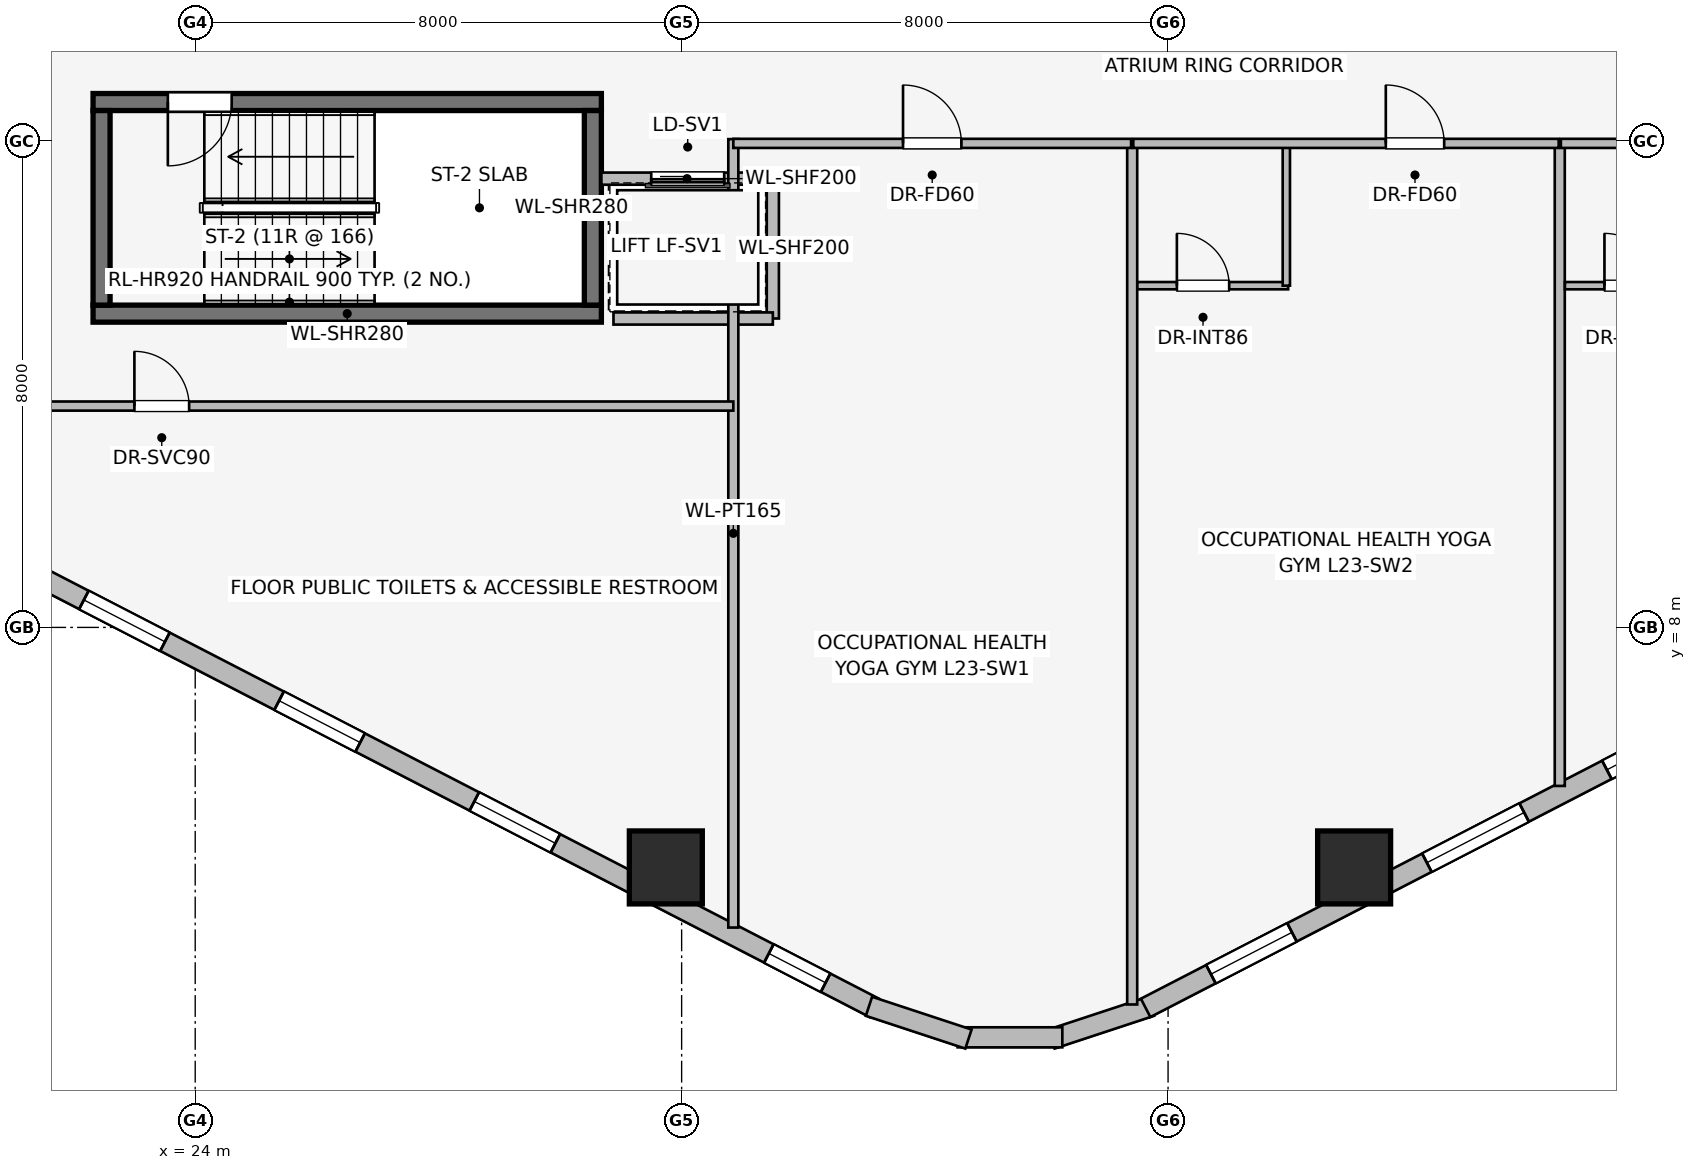
"""IFC4 building model, lengths in metres.
Left out: names, types, materials, properties, quantities, classifications, styles, units other than length and angle.
Written with IfcOpenShell. Run it as: python <this file> out.ifc"""

import sys

from ifc_helpers import new_model, si_unit, direction, frame, frame_2d, origin, origin_2d, place, context, subcontext, project, spatial, rectangle, extrude, element, fill, save


model = new_model("IFC4")
c1 = context("Model", 3, precision=1e-05, world=origin(), true_north=direction((0.0, 1.0)))
c2 = subcontext(c1, "Body", "Model", "MODEL_VIEW")
j1 = project(units=[si_unit("LENGTHUNIT", "METRE"), si_unit("PLANEANGLEUNIT", "RADIAN")], contexts=[c1])
p1 = place(None, origin())
s1 = spatial("IfcSite", under=j1, at=p1, CompositionType="ELEMENT")
p2 = place(p1, origin())
s2 = spatial("IfcBuilding", under=s1, at=p2, CompositionType="ELEMENT")
p3 = place(p2, frame((0.0, 0.0, 89.05)))
s3 = spatial("IfcBuildingStorey", under=s2, at=p3, CompositionType="ELEMENT", Elevation=89.05)
p4 = place(p3, frame((22.32, 13.16, 0.0), z_axis=(0.0, 0.0, 1.0), x_axis=(1.0, 0.0, 0.0)))
e1 = element("IfcWall", 1, at=p4, inside=s3, PredefinedType="SHEAR", context=c2, shape_type="SweptSolid", body=[
    extrude(rectangle(XDim=8.36, YDim=0.28, at=frame_2d((4.18, 0.0))), origin(), (0.0, 0.0, 1.0), 3.65),
])
p5 = place(p3, frame((30.68, 16.64, 0.0), z_axis=(0.0, 0.0, 1.0), x_axis=(-1.0, 0.0, 0.0)))
e2 = element("IfcWall", 2, at=p5, inside=s3, PredefinedType="SHEAR", context=c2, shape_type="SweptSolid", body=[
    extrude(rectangle(XDim=8.36, YDim=0.28, at=frame_2d((4.18, 0.0))), origin(), (0.0, 0.0, 1.0), 3.65),
])
p6 = place(p5, frame((6.08, 0.0, 0.0)))
e3 = element("IfcOpeningElement", 3, at=p6, cuts=e2, PredefinedType="OPENING", context=c2, shape_type="SweptSolid", body=[
    extrude(rectangle(XDim=1.05, YDim=2.0, at=frame_2d((0.525, 1.0))), frame((0.0, 0.15, 0.0), z_axis=(0.0, -1.0, 0.0), x_axis=(1.0, 0.0, 0.0)), (0.0, 0.0, 1.0), 0.3),
])
for number, where, z_axis, x_axis in (
    (4, (22.46, 16.5, 0.0), (0.0, 0.0, 1.0), (0.0, -1.0, 0.0)),
    (5, (30.54, 13.3, 0.0), (0.0, 0.0, 1.0), (0.0, 1.0, 0.0)),
):
    element("IfcWall", number, at=place(p3, frame(where, z_axis=z_axis, x_axis=x_axis)), inside=s3, PredefinedType="SHEAR", context=c2, shape_type="SweptSolid", body=[
        extrude(rectangle(XDim=3.2, YDim=0.28, at=frame_2d((1.6, 0.0))), origin(), (0.0, 0.0, 1.0), 3.65),
    ])
for number, where, z_axis, x_axis in (
    (6, (31.74, 4.053, 0.0), (0.0, 0.0, 1.0), (1.0, 0.0, 0.0)),
    (7, (43.06, 4.053, 0.0), (0.0, 0.0, 1.0), (1.0, 0.0, 0.0)),
):
    element("IfcColumn", number, at=place(p3, frame(where, z_axis=z_axis, x_axis=x_axis)), inside=s3, PredefinedType="COLUMN", context=c2, shape_type="SweptSolid", body=[
        extrude(rectangle(XDim=1.2, YDim=1.2, at=origin_2d()), origin(), (0.0, 0.0, 1.0), 3.65),
    ])
p7 = place(p3, frame((35.169, 1.743, 0.0), z_axis=(0.0, 0.0, 1.0), x_axis=(-0.888634413993, 0.458616264721, 0.0)))
e8 = element("IfcWall", 8, at=p7, inside=s3, PredefinedType="STANDARD", context=c2, shape_type="SweptSolid", body=[
    extrude(rectangle(XDim=20.531, YDim=0.34, at=frame_2d((10.266, 0.0))), origin(), (0.0, 0.0, 1.0), 2.684),
])
p8 = place(p7, frame((0.902, 0.0, 0.75)))
e9 = element("IfcOpeningElement", 9, at=p8, cuts=e8, PredefinedType="OPENING", context=c2, shape_type="SweptSolid", body=[
    extrude(rectangle(XDim=1.05, YDim=1.4, at=frame_2d((0.525, 0.7))), frame((0.0, 0.18, 0.0), z_axis=(0.0, -1.0, 0.0), x_axis=(1.0, 0.0, 0.0)), (0.0, 0.0, 1.0), 0.36),
])
p9 = place(p7, frame((5.903, 0.0, 0.75)))
e10 = element("IfcOpeningElement", 10, at=p9, cuts=e8, PredefinedType="OPENING", context=c2, shape_type="SweptSolid", body=[
    extrude(rectangle(XDim=1.5, YDim=1.5, at=frame_2d((0.75, 0.75))), frame((0.0, 0.18, 0.0), z_axis=(0.0, -1.0, 0.0), x_axis=(1.0, 0.0, 0.0)), (0.0, 0.0, 1.0), 0.36),
])
p10 = place(p7, frame((9.516, 0.0, 0.75)))
e11 = element("IfcOpeningElement", 11, at=p10, cuts=e8, PredefinedType="OPENING", context=c2, shape_type="SweptSolid", body=[
    extrude(rectangle(XDim=1.5, YDim=1.5, at=frame_2d((0.75, 0.75))), frame((0.0, 0.18, 0.0), z_axis=(0.0, -1.0, 0.0), x_axis=(1.0, 0.0, 0.0)), (0.0, 0.0, 1.0), 0.36),
])
p11 = place(p7, frame((13.129, 0.0, 0.75)))
e12 = element("IfcOpeningElement", 12, at=p11, cuts=e8, PredefinedType="OPENING", context=c2, shape_type="SweptSolid", body=[
    extrude(rectangle(XDim=1.5, YDim=1.5, at=frame_2d((0.75, 0.75))), frame((0.0, 0.18, 0.0), z_axis=(0.0, -1.0, 0.0), x_axis=(1.0, 0.0, 0.0)), (0.0, 0.0, 1.0), 0.36),
])
p12 = place(p7, frame((17.673, 0.0, 0.75)))
e13 = element("IfcOpeningElement", 13, at=p12, cuts=e8, PredefinedType="OPENING", context=c2, shape_type="SweptSolid", body=[
    extrude(rectangle(XDim=1.8, YDim=1.5, at=frame_2d((0.9, 0.75))), frame((0.0, 0.18, 0.0), z_axis=(0.0, -1.0, 0.0), x_axis=(1.0, 0.0, 0.0)), (0.0, 0.0, 1.0), 0.36),
])
p13 = place(p3, frame((39.719, 1.769, 0.0), z_axis=(0.0, 0.0, 1.0), x_axis=(-0.94976901097, -0.312951794691, 0.0)))
e14 = element("IfcWall", 14, at=p13, inside=s3, PredefinedType="STANDARD", context=c2, shape_type="SweptSolid", body=[
    extrude(rectangle(XDim=1.722, YDim=0.33, at=frame_2d((0.861, 0.0))), origin(), (0.0, 0.0, 1.0), 3.39),
])
p14 = place(p3, frame((38.261, 1.259, 0.0), z_axis=(0.0, 0.0, 1.0), x_axis=(-1.0, 0.0, 0.0)))
e15 = element("IfcWall", 15, at=p14, inside=s3, PredefinedType="STANDARD", context=c2, shape_type="SweptSolid", body=[
    extrude(rectangle(XDim=1.722, YDim=0.33, at=frame_2d((0.861, 0.0))), origin(), (0.0, 0.0, 1.0), 3.39),
])
p15 = place(p3, frame((36.717, 1.23, 0.0), z_axis=(0.0, 0.0, 1.0), x_axis=(-0.94976901097, 0.312951794691, 0.0)))
e16 = element("IfcWall", 16, at=p15, inside=s3, PredefinedType="STANDARD", context=c2, shape_type="SweptSolid", body=[
    extrude(rectangle(XDim=1.722, YDim=0.33, at=frame_2d((0.861, 0.0))), origin(), (0.0, 0.0, 1.0), 3.39),
])
p16 = place(p3, frame((57.876, 11.159, 0.0), z_axis=(0.0, 0.0, 1.0), x_axis=(-0.888634413993, -0.458616264721, 0.0)))
e17 = element("IfcWall", 17, at=p16, inside=s3, PredefinedType="STANDARD", context=c2, shape_type="SweptSolid", body=[
    extrude(rectangle(XDim=20.531, YDim=0.34, at=frame_2d((10.266, 0.0))), origin(), (0.0, 0.0, 1.0), 2.684),
])
p17 = place(p16, frame((1.058, 0.0, 0.75)))
e18 = element("IfcOpeningElement", 18, at=p17, cuts=e17, PredefinedType="OPENING", context=c2, shape_type="SweptSolid", body=[
    extrude(rectangle(XDim=1.8, YDim=1.5, at=frame_2d((0.9, 0.75))), frame((0.0, 0.18, 0.0), z_axis=(0.0, -1.0, 0.0), x_axis=(1.0, 0.0, 0.0)), (0.0, 0.0, 1.0), 0.36),
])
p18 = place(p16, frame((5.703, 0.0, 0.75)))
e19 = element("IfcOpeningElement", 19, at=p18, cuts=e17, PredefinedType="OPENING", context=c2, shape_type="SweptSolid", body=[
    extrude(rectangle(XDim=1.5, YDim=1.5, at=frame_2d((0.75, 0.75))), frame((0.0, 0.18, 0.0), z_axis=(0.0, -1.0, 0.0), x_axis=(1.0, 0.0, 0.0)), (0.0, 0.0, 1.0), 0.36),
])
p19 = place(p16, frame((8.099, 0.0, 0.75)))
e20 = element("IfcOpeningElement", 20, at=p19, cuts=e17, PredefinedType="OPENING", context=c2, shape_type="SweptSolid", body=[
    extrude(rectangle(XDim=1.5, YDim=1.5, at=frame_2d((0.75, 0.75))), frame((0.0, 0.18, 0.0), z_axis=(0.0, -1.0, 0.0), x_axis=(1.0, 0.0, 0.0)), (0.0, 0.0, 1.0), 0.36),
])
p20 = place(p16, frame((10.495, 0.0, 0.75)))
e21 = element("IfcOpeningElement", 21, at=p20, cuts=e17, PredefinedType="OPENING", context=c2, shape_type="SweptSolid", body=[
    extrude(rectangle(XDim=1.5, YDim=1.5, at=frame_2d((0.75, 0.75))), frame((0.0, 0.18, 0.0), z_axis=(0.0, -1.0, 0.0), x_axis=(1.0, 0.0, 0.0)), (0.0, 0.0, 1.0), 0.36),
])
p21 = place(p16, frame((13.526, 0.0, 0.75)))
e22 = element("IfcOpeningElement", 22, at=p21, cuts=e17, PredefinedType="OPENING", context=c2, shape_type="SweptSolid", body=[
    extrude(rectangle(XDim=1.8, YDim=1.5, at=frame_2d((0.9, 0.75))), frame((0.0, 0.18, 0.0), z_axis=(0.0, -1.0, 0.0), x_axis=(1.0, 0.0, 0.0)), (0.0, 0.0, 1.0), 0.36),
])
p22 = place(p16, frame((17.823, 0.0, 0.75)))
e23 = element("IfcOpeningElement", 23, at=p22, cuts=e17, PredefinedType="OPENING", context=c2, shape_type="SweptSolid", body=[
    extrude(rectangle(XDim=1.5, YDim=1.5, at=frame_2d((0.75, 0.75))), frame((0.0, 0.18, 0.0), z_axis=(0.0, -1.0, 0.0), x_axis=(1.0, 0.0, 0.0)), (0.0, 0.0, 1.0), 0.36),
])
p23 = place(p3, frame((33.5, 15.38, 0.0), z_axis=(0.0, 0.0, 1.0), x_axis=(-1.0, 0.0, 0.0)))
e24 = element("IfcWall", 24, at=p23, inside=s3, PredefinedType="PARTITIONING", context=c2, shape_type="SweptSolid", body=[
    extrude(rectangle(XDim=2.82, YDim=0.2, at=frame_2d((1.41, 0.0))), origin(), (0.0, 0.0, 1.0), 3.39),
])
p24 = place(p23, frame((0.8, 0.0, 0.0)))
e25 = element("IfcOpeningElement", 25, at=p24, cuts=e24, PredefinedType="OPENING", context=c2, shape_type="SweptSolid", body=[
    extrude(rectangle(XDim=1.2, YDim=2.2, at=frame_2d((0.6, 1.1))), frame((0.0, 0.11, 0.0), z_axis=(0.0, -1.0, 0.0), x_axis=(1.0, 0.0, 0.0)), (0.0, 0.0, 1.0), 0.22),
])
p25 = place(p3, frame((33.5, 13.08, 0.0), z_axis=(0.0, 0.0, 1.0), x_axis=(0.0, 1.0, 0.0)))
e26 = element("IfcWall", 26, at=p25, inside=s3, PredefinedType="PARTITIONING", context=c2, shape_type="SweptSolid", body=[
    extrude(rectangle(XDim=2.3, YDim=0.2, at=frame_2d((1.15, 0.0))), origin(), (0.0, 0.0, 1.0), 3.39),
])
p26 = place(p3, frame((30.879, 13.08, 0.0), z_axis=(0.0, 0.0, 1.0), x_axis=(1.0, 0.0, 0.0)))
e27 = element("IfcWall", 27, at=p26, inside=s3, PredefinedType="PARTITIONING", context=c2, shape_type="SweptSolid", body=[
    extrude(rectangle(XDim=2.621, YDim=0.2, at=frame_2d((1.311, 0.0))), origin(), (0.0, 0.0, 1.0), 3.39),
])
p27 = place(p3, frame((32.85, 3.064, 0.0), z_axis=(0.0, 0.0, 1.0), x_axis=(0.0, 1.0, 0.0)))
e28 = element("IfcWall", 28, at=p27, inside=s3, PredefinedType="PARTITIONING", context=c2, shape_type="SweptSolid", body=[
    extrude(rectangle(XDim=12.966, YDim=0.165, at=frame_2d((6.483, 0.0))), origin(), (0.0, 0.0, 1.0), 3.39),
])
p28 = place(p3, frame((16.487, 11.64, 0.0), z_axis=(0.0, 0.0, 1.0), x_axis=(1.0, 0.0, 0.0)))
e29 = element("IfcWall", 29, at=p28, inside=s3, PredefinedType="PARTITIONING", context=c2, shape_type="SweptSolid", body=[
    extrude(rectangle(XDim=16.363, YDim=0.15, at=frame_2d((8.182, 0.0))), origin(), (0.0, 0.0, 1.0), 3.39),
])
p29 = place(p28, frame((6.513, 0.0, 0.0)))
e30 = element("IfcOpeningElement", 30, at=p29, cuts=e29, PredefinedType="OPENING", context=c2, shape_type="SweptSolid", body=[
    extrude(rectangle(XDim=0.9, YDim=2.0, at=frame_2d((0.45, 1.0))), frame((0.0, 0.085, 0.0), z_axis=(0.0, -1.0, 0.0), x_axis=(1.0, 0.0, 0.0)), (0.0, 0.0, 1.0), 0.17),
])
p30 = place(p3, frame((39.41, 1.799, 0.0), z_axis=(0.0, 0.0, 1.0), x_axis=(0.0, 1.0, 0.0)))
e31 = element("IfcWall", 31, at=p30, inside=s3, PredefinedType="PARTITIONING", context=c2, shape_type="SweptSolid", body=[
    extrude(rectangle(XDim=14.131, YDim=0.165, at=frame_2d((7.065, 0.0))), origin(), (0.0, 0.0, 1.0), 3.39),
])
p31 = place(p3, frame((46.442, 5.393, 0.0), z_axis=(0.0, 0.0, 1.0), x_axis=(0.0, 1.0, 0.0)))
e32 = element("IfcWall", 32, at=p31, inside=s3, PredefinedType="PARTITIONING", context=c2, shape_type="SweptSolid", body=[
    extrude(rectangle(XDim=10.537, YDim=0.165, at=frame_2d((5.269, 0.0))), origin(), (0.0, 0.0, 1.0), 3.39),
])
p32 = place(p3, frame((32.85, 15.96, 0.0), z_axis=(0.0, 0.0, 1.0), x_axis=(1.0, 0.0, 0.0)))
e33 = element("IfcWall", 33, at=p32, inside=s3, PredefinedType="PARTITIONING", context=c2, shape_type="SweptSolid", body=[
    extrude(rectangle(XDim=6.542, YDim=0.15, at=frame_2d((3.271, 0.0))), origin(), (0.0, 0.0, 1.0), 3.39),
])
p33 = place(p32, frame((2.791, 0.0, 0.0)))
e34 = element("IfcOpeningElement", 34, at=p33, cuts=e33, PredefinedType="OPENING", context=c2, shape_type="SweptSolid", body=[
    extrude(rectangle(XDim=0.96, YDim=2.0, at=frame_2d((0.48, 1.0))), frame((0.0, 0.085, 0.0), z_axis=(0.0, -1.0, 0.0), x_axis=(1.0, 0.0, 0.0)), (0.0, 0.0, 1.0), 0.17),
])
p34 = place(p3, frame((39.495, 13.62, 0.0), z_axis=(0.0, 0.0, 1.0), x_axis=(1.0, 0.0, 0.0)))
e35 = element("IfcWall", 35, at=p34, inside=s3, PredefinedType="PARTITIONING", context=c2, shape_type="SweptSolid", body=[
    extrude(rectangle(XDim=2.48, YDim=0.12, at=frame_2d((1.24, 0.0))), origin(), (0.0, 0.0, 1.0), 3.39),
])
p35 = place(p34, frame((0.65, 0.0, 0.0)))
e36 = element("IfcOpeningElement", 36, at=p35, cuts=e35, PredefinedType="OPENING", context=c2, shape_type="SweptSolid", body=[
    extrude(rectangle(XDim=0.86, YDim=2.0, at=frame_2d((0.43, 1.0))), frame((0.0, 0.07, 0.0), z_axis=(0.0, -1.0, 0.0), x_axis=(1.0, 0.0, 0.0)), (0.0, 0.0, 1.0), 0.14),
])
p36 = place(p3, frame((41.945, 13.62, 0.0), z_axis=(0.0, 0.0, 1.0), x_axis=(0.0, 1.0, 0.0)))
e37 = element("IfcWall", 37, at=p36, inside=s3, PredefinedType="PARTITIONING", context=c2, shape_type="SweptSolid", body=[
    extrude(rectangle(XDim=2.3, YDim=0.12, at=frame_2d((1.15, 0.0))), origin(), (0.0, 0.0, 1.0), 3.39),
])
p37 = place(p3, frame((39.428, 15.96, 0.0), z_axis=(0.0, 0.0, 1.0), x_axis=(1.0, 0.0, 0.0)))
e38 = element("IfcWall", 38, at=p37, inside=s3, PredefinedType="PARTITIONING", context=c2, shape_type="SweptSolid", body=[
    extrude(rectangle(XDim=6.996, YDim=0.15, at=frame_2d((3.498, 0.0))), origin(), (0.0, 0.0, 1.0), 3.39),
])
p38 = place(p37, frame((4.153, 0.0, 0.0)))
e39 = element("IfcOpeningElement", 39, at=p38, cuts=e38, PredefinedType="OPENING", context=c2, shape_type="SweptSolid", body=[
    extrude(rectangle(XDim=0.96, YDim=2.0, at=frame_2d((0.48, 1.0))), frame((0.0, 0.085, 0.0), z_axis=(0.0, -1.0, 0.0), x_axis=(1.0, 0.0, 0.0)), (0.0, 0.0, 1.0), 0.17),
])
p39 = place(p3, frame((46.527, 13.62, 0.0), z_axis=(0.0, 0.0, 1.0), x_axis=(1.0, 0.0, 0.0)))
e40 = element("IfcWall", 40, at=p39, inside=s3, PredefinedType="PARTITIONING", context=c2, shape_type="SweptSolid", body=[
    extrude(rectangle(XDim=2.48, YDim=0.12, at=frame_2d((1.24, 0.0))), origin(), (0.0, 0.0, 1.0), 3.39),
])
p40 = place(p39, frame((0.65, 0.0, 0.0)))
e41 = element("IfcOpeningElement", 41, at=p40, cuts=e40, PredefinedType="OPENING", context=c2, shape_type="SweptSolid", body=[
    extrude(rectangle(XDim=0.86, YDim=2.0, at=frame_2d((0.43, 1.0))), frame((0.0, 0.07, 0.0), z_axis=(0.0, -1.0, 0.0), x_axis=(1.0, 0.0, 0.0)), (0.0, 0.0, 1.0), 0.14),
])
p41 = place(p3, frame((46.46, 15.96, 0.0), z_axis=(0.0, 0.0, 1.0), x_axis=(1.0, 0.0, 0.0)))
e42 = element("IfcWall", 42, at=p41, inside=s3, PredefinedType="PARTITIONING", context=c2, shape_type="SweptSolid", body=[
    extrude(rectangle(XDim=6.995, YDim=0.15, at=frame_2d((3.498, 0.0))), origin(), (0.0, 0.0, 1.0), 3.39),
])
p42 = place(p41, frame((4.153, 0.0, 0.0)))
e43 = element("IfcOpeningElement", 43, at=p42, cuts=e42, PredefinedType="OPENING", context=c2, shape_type="SweptSolid", body=[
    extrude(rectangle(XDim=0.96, YDim=2.0, at=frame_2d((0.48, 1.0))), frame((0.0, 0.085, 0.0), z_axis=(0.0, -1.0, 0.0), x_axis=(1.0, 0.0, 0.0)), (0.0, 0.0, 1.0), 0.17),
])
p43 = place(p8, origin())
e44 = element("IfcWindow", 44, at=p43, inside=s3, PartitioningType="SINGLE_PANEL", PredefinedType="WINDOW", context=c2, shape_type="SweptSolid", body=[
    extrude(rectangle(XDim=1.05, YDim=1.4, at=frame_2d((0.525, 0.7))), frame((0.0, 0.03, 0.0), z_axis=(0.0, -1.0, 0.0), x_axis=(1.0, 0.0, 0.0)), (0.0, 0.0, 1.0), 0.06),
])
fill(e9, e44)
p44 = place(p9, origin())
e45 = element("IfcWindow", 45, at=p44, inside=s3, PartitioningType="SINGLE_PANEL", PredefinedType="WINDOW", context=c2, shape_type="SweptSolid", body=[
    extrude(rectangle(XDim=1.5, YDim=1.5, at=frame_2d((0.75, 0.75))), frame((0.0, 0.03, 0.0), z_axis=(0.0, -1.0, 0.0), x_axis=(1.0, 0.0, 0.0)), (0.0, 0.0, 1.0), 0.06),
])
fill(e10, e45)
p45 = place(p10, origin())
e46 = element("IfcWindow", 46, at=p45, inside=s3, PartitioningType="SINGLE_PANEL", PredefinedType="WINDOW", context=c2, shape_type="SweptSolid", body=[
    extrude(rectangle(XDim=1.5, YDim=1.5, at=frame_2d((0.75, 0.75))), frame((0.0, 0.03, 0.0), z_axis=(0.0, -1.0, 0.0), x_axis=(1.0, 0.0, 0.0)), (0.0, 0.0, 1.0), 0.06),
])
fill(e11, e46)
p46 = place(p11, origin())
e47 = element("IfcWindow", 47, at=p46, inside=s3, PartitioningType="SINGLE_PANEL", PredefinedType="WINDOW", context=c2, shape_type="SweptSolid", body=[
    extrude(rectangle(XDim=1.5, YDim=1.5, at=frame_2d((0.75, 0.75))), frame((0.0, 0.03, 0.0), z_axis=(0.0, -1.0, 0.0), x_axis=(1.0, 0.0, 0.0)), (0.0, 0.0, 1.0), 0.06),
])
fill(e12, e47)
p47 = place(p20, origin())
e48 = element("IfcWindow", 48, at=p47, inside=s3, PartitioningType="SINGLE_PANEL", PredefinedType="WINDOW", context=c2, shape_type="SweptSolid", body=[
    extrude(rectangle(XDim=1.5, YDim=1.5, at=frame_2d((0.75, 0.75))), frame((0.0, 0.03, 0.0), z_axis=(0.0, -1.0, 0.0), x_axis=(1.0, 0.0, 0.0)), (0.0, 0.0, 1.0), 0.06),
])
fill(e21, e48)
p48 = place(p21, origin())
e49 = element("IfcWindow", 49, at=p48, inside=s3, PartitioningType="SINGLE_PANEL", PredefinedType="WINDOW", context=c2, shape_type="SweptSolid", body=[
    extrude(rectangle(XDim=1.8, YDim=1.5, at=frame_2d((0.9, 0.75))), frame((0.0, 0.03, 0.0), z_axis=(0.0, -1.0, 0.0), x_axis=(1.0, 0.0, 0.0)), (0.0, 0.0, 1.0), 0.06),
])
fill(e22, e49)
p49 = place(p22, origin())
e50 = element("IfcWindow", 50, at=p49, inside=s3, PartitioningType="SINGLE_PANEL", PredefinedType="WINDOW", context=c2, shape_type="SweptSolid", body=[
    extrude(rectangle(XDim=1.5, YDim=1.5, at=frame_2d((0.75, 0.75))), frame((0.0, 0.03, 0.0), z_axis=(0.0, -1.0, 0.0), x_axis=(1.0, 0.0, 0.0)), (0.0, 0.0, 1.0), 0.06),
])
fill(e23, e50)
p50 = place(p6, origin())
e51 = element("IfcDoor", 51, at=p50, inside=s3, OperationType="SINGLE_SWING_RIGHT", PredefinedType="DOOR", context=c2, shape_type="SweptSolid", body=[
    extrude(rectangle(XDim=1.05, YDim=2.0, at=frame_2d((0.525, 1.0))), frame((0.0, 0.025, 0.0), z_axis=(0.0, -1.0, 0.0), x_axis=(1.0, 0.0, 0.0)), (0.0, 0.0, 1.0), 0.05),
])
fill(e3, e51)
p51 = place(p24, origin())
e52 = element("IfcDoor", 52, at=p51, inside=s3, OperationType="SLIDING_TO_RIGHT", PredefinedType="DOOR", context=c2, shape_type="SweptSolid", body=[
    extrude(rectangle(XDim=1.2, YDim=2.2, at=frame_2d((0.6, 1.1))), frame((0.0, 0.025, 0.0), z_axis=(0.0, -1.0, 0.0), x_axis=(1.0, 0.0, 0.0)), (0.0, 0.0, 1.0), 0.05),
])
fill(e25, e52)
p52 = place(p29, origin())
e53 = element("IfcDoor", 53, at=p52, inside=s3, OperationType="SINGLE_SWING_LEFT", PredefinedType="DOOR", context=c2, shape_type="SweptSolid", body=[
    extrude(rectangle(XDim=0.9, YDim=2.0, at=frame_2d((0.45, 1.0))), frame((0.0, 0.025, 0.0), z_axis=(0.0, -1.0, 0.0), x_axis=(1.0, 0.0, 0.0)), (0.0, 0.0, 1.0), 0.05),
])
fill(e30, e53)
p53 = place(p33, origin())
e54 = element("IfcDoor", 54, at=p53, inside=s3, OperationType="SINGLE_SWING_LEFT", PredefinedType="DOOR", context=c2, shape_type="SweptSolid", body=[
    extrude(rectangle(XDim=0.96, YDim=2.0, at=frame_2d((0.48, 1.0))), frame((0.0, 0.025, 0.0), z_axis=(0.0, -1.0, 0.0), x_axis=(1.0, 0.0, 0.0)), (0.0, 0.0, 1.0), 0.05),
])
fill(e34, e54)
p54 = place(p35, origin())
e55 = element("IfcDoor", 55, at=p54, inside=s3, OperationType="SINGLE_SWING_LEFT", PredefinedType="DOOR", context=c2, shape_type="SweptSolid", body=[
    extrude(rectangle(XDim=0.86, YDim=2.0, at=frame_2d((0.43, 1.0))), frame((0.0, 0.025, 0.0), z_axis=(0.0, -1.0, 0.0), x_axis=(1.0, 0.0, 0.0)), (0.0, 0.0, 1.0), 0.05),
])
fill(e36, e55)
p55 = place(p38, origin())
e56 = element("IfcDoor", 56, at=p55, inside=s3, OperationType="SINGLE_SWING_LEFT", PredefinedType="DOOR", context=c2, shape_type="SweptSolid", body=[
    extrude(rectangle(XDim=0.96, YDim=2.0, at=frame_2d((0.48, 1.0))), frame((0.0, 0.025, 0.0), z_axis=(0.0, -1.0, 0.0), x_axis=(1.0, 0.0, 0.0)), (0.0, 0.0, 1.0), 0.05),
])
fill(e39, e56)
p56 = place(p40, origin())
e57 = element("IfcDoor", 57, at=p56, inside=s3, OperationType="SINGLE_SWING_LEFT", PredefinedType="DOOR", context=c2, shape_type="SweptSolid", body=[
    extrude(rectangle(XDim=0.86, YDim=2.0, at=frame_2d((0.43, 1.0))), frame((0.0, 0.025, 0.0), z_axis=(0.0, -1.0, 0.0), x_axis=(1.0, 0.0, 0.0)), (0.0, 0.0, 1.0), 0.05),
])
fill(e41, e57)
save(model, sys.argv[1])
